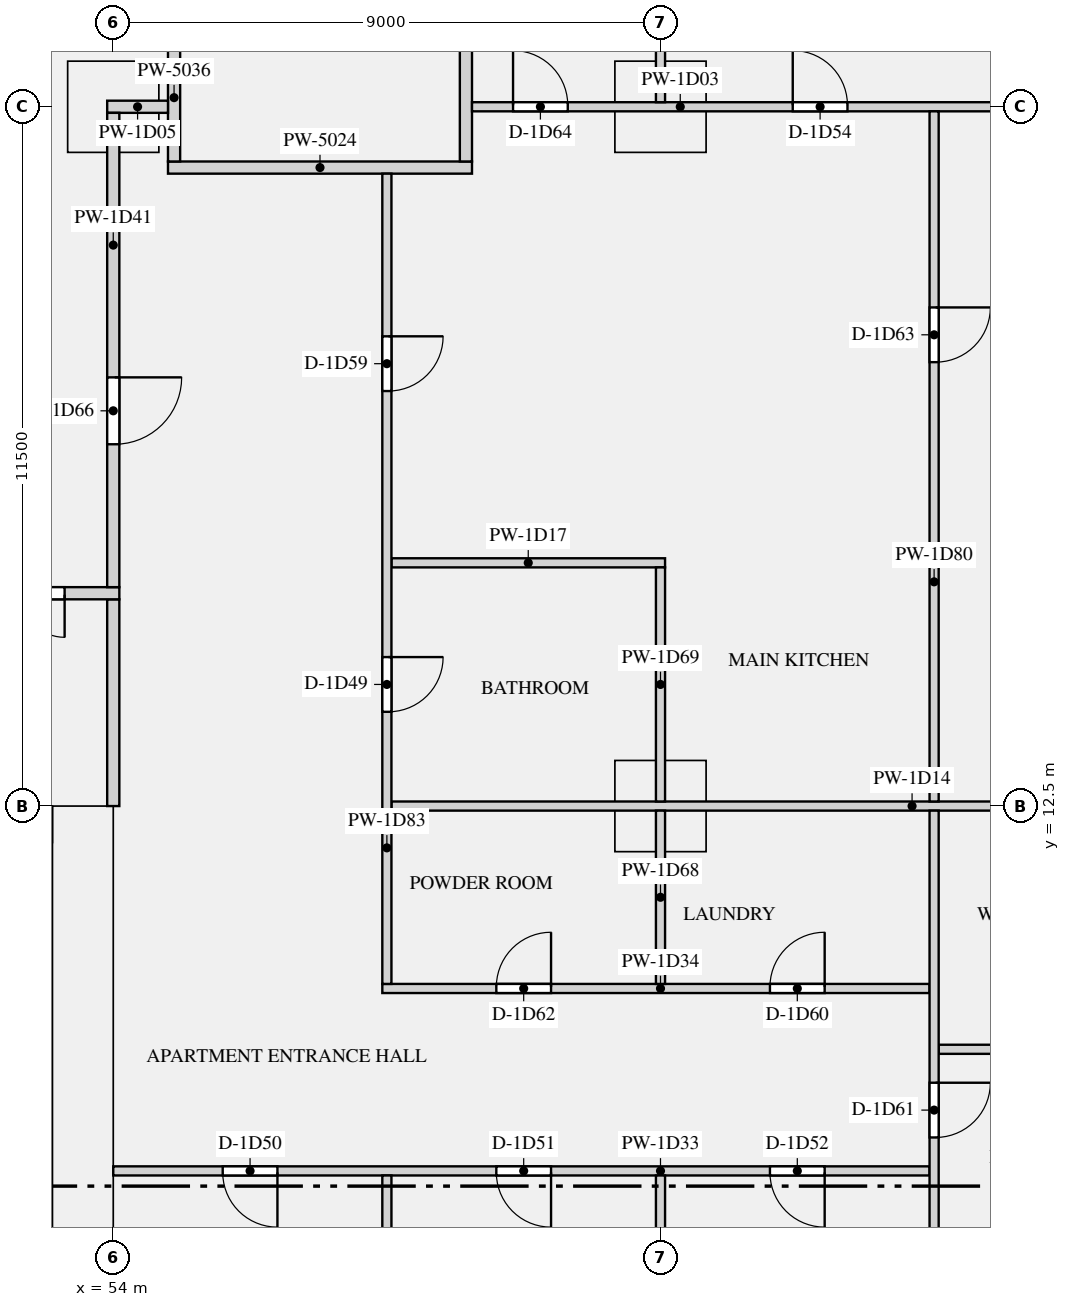
"""IFC4 building model, lengths in metres.
Left out: names, types, materials, properties, quantities, classifications, styles, units other than length and angle.
Written with IfcOpenShell. Run it as: python <this file> out.ifc"""

import sys

from ifc_helpers import new_model, si_unit, direction, frame, frame_2d, origin, origin_2d, place, context, subcontext, project, spatial, rectangle, extrude, element, fill, save


model = new_model("IFC4")
c1 = context("Model", 3, precision=1e-05, world=origin(), true_north=direction((0.0, 1.0)))
c2 = subcontext(c1, "Body", "Model", "MODEL_VIEW")
j1 = project(units=[si_unit("LENGTHUNIT", "METRE"), si_unit("PLANEANGLEUNIT", "RADIAN")], contexts=[c1])
p1 = place(None, origin())
s1 = spatial("IfcSite", under=j1, at=p1, CompositionType="ELEMENT")
p2 = place(p1, origin())
s2 = spatial("IfcBuilding", under=s1, at=p2, CompositionType="ELEMENT")
p3 = place(p2, frame((0.0, 0.0, 47.85)))
s3 = spatial("IfcBuildingStorey", under=s2, at=p3, CompositionType="ELEMENT", Elevation=47.85)
for number, where, z_axis, x_axis in (
    (1, (54.0, 24.0, 0.0), (0.0, 0.0, 1.0), (1.0, 0.0, 0.0)),
    (2, (63.0, 24.0, 0.0), (0.0, 0.0, 1.0), (1.0, 0.0, 0.0)),
    (3, (63.0, 12.5, 0.0), (0.0, 0.0, 1.0), (1.0, 0.0, 0.0)),
):
    element("IfcColumn", number, at=place(p3, frame(where, z_axis=z_axis, x_axis=x_axis)), inside=s3, PredefinedType="COLUMN", context=c2, shape_type="SweptSolid", body=[
        extrude(rectangle(XDim=1.5, YDim=1.5, at=origin_2d()), origin(), (0.0, 0.0, 1.0), 3.15),
    ])
p4 = place(p3, frame((53.5, 0.0, 0.0), z_axis=(0.0, 0.0, 1.0), x_axis=(0.0, 1.0, 0.0)))
e4 = element("IfcWall", 4, at=p4, inside=s3, PredefinedType="SHEAR", context=c2, shape_type="SweptSolid", body=[
    extrude(rectangle(XDim=12.5, YDim=1.0, at=frame_2d((6.25, 0.0))), origin(), (0.0, 0.0, 1.0), 3.15),
])
p5 = place(p3, frame((54.9, 23.0, 0.0), z_axis=(0.0, 0.0, 1.0), x_axis=(1.0, 0.0, 0.0)))
e5 = element("IfcWall", 5, at=p5, inside=s3, PredefinedType="PARTITIONING", context=c2, shape_type="SweptSolid", body=[
    extrude(rectangle(XDim=5.0, YDim=0.2, at=frame_2d((2.5, 0.0))), origin(), (0.0, 0.0, 1.0), 2.83),
])
p6 = place(p3, frame((54.0, 12.5, 0.0), z_axis=(0.0, 0.0, 1.0), x_axis=(0.0, 1.0, 0.0)))
e6 = element("IfcWall", 6, at=p6, inside=s3, PredefinedType="PARTITIONING", context=c2, shape_type="SweptSolid", body=[
    extrude(rectangle(XDim=3.4, YDim=0.2, at=frame_2d((1.7, 0.0))), origin(), (0.0, 0.0, 1.0), 2.83),
])
p7 = place(p3, frame((55.0, 23.1, 0.0), z_axis=(0.0, 0.0, 1.0), x_axis=(0.0, 1.0, 0.0)))
e7 = element("IfcWall", 7, at=p7, inside=s3, PredefinedType="PARTITIONING", context=c2, shape_type="SweptSolid", body=[
    extrude(rectangle(XDim=3.8, YDim=0.2, at=frame_2d((1.9, 0.0))), origin(), (0.0, 0.0, 1.0), 2.83),
])
p8 = place(p7, frame((2.1, 0.0, 0.0)))
e8 = element("IfcOpeningElement", 8, at=p8, cuts=e7, PredefinedType="OPENING", context=c2, shape_type="SweptSolid", body=[
    extrude(rectangle(XDim=1.2, YDim=2.1, at=frame_2d((0.6, 1.05))), frame((0.0, 0.11, 0.0), z_axis=(0.0, -1.0, 0.0), x_axis=(1.0, 0.0, 0.0)), (0.0, 0.0, 1.0), 0.22),
])
p9 = place(p3, frame((59.8, 23.1, 0.0), z_axis=(0.0, 0.0, 1.0), x_axis=(0.0, 1.0, 0.0)))
e9 = element("IfcWall", 9, at=p9, inside=s3, PredefinedType="PARTITIONING", context=c2, shape_type="SweptSolid", body=[
    extrude(rectangle(XDim=3.9, YDim=0.2, at=frame_2d((1.95, 0.0))), origin(), (0.0, 0.0, 1.0), 2.83),
])
p10 = place(p3, frame((59.9, 24.0, 0.0), z_axis=(0.0, 0.0, 1.0), x_axis=(1.0, 0.0, 0.0)))
e10 = element("IfcWall", 10, at=p10, inside=s3, PredefinedType="PARTITIONING", context=c2, shape_type="SweptSolid", body=[
    extrude(rectangle(XDim=13.3, YDim=0.15, at=frame_2d((6.65, 0.0))), origin(), (0.0, 0.0, 1.0), 2.83),
])
p11 = place(p10, frame((5.275, 0.0, 0.0)))
e11 = element("IfcOpeningElement", 11, at=p11, cuts=e10, PredefinedType="OPENING", context=c2, shape_type="SweptSolid", body=[
    extrude(rectangle(XDim=0.9, YDim=2.1, at=frame_2d((0.45, 1.05))), frame((0.0, 0.085, 0.0), z_axis=(0.0, -1.0, 0.0), x_axis=(1.0, 0.0, 0.0)), (0.0, 0.0, 1.0), 0.17),
])
p12 = place(p10, frame((8.725, 0.0, 0.0)))
e12 = element("IfcOpeningElement", 12, at=p12, cuts=e10, PredefinedType="OPENING", context=c2, shape_type="SweptSolid", body=[
    extrude(rectangle(XDim=1.5, YDim=2.1, at=frame_2d((0.75, 1.05))), frame((0.0, 0.085, 0.0), z_axis=(0.0, -1.0, 0.0), x_axis=(1.0, 0.0, 0.0)), (0.0, 0.0, 1.0), 0.17),
])
p13 = place(p10, frame((0.675, 0.0, 0.0)))
e13 = element("IfcOpeningElement", 13, at=p13, cuts=e10, PredefinedType="OPENING", context=c2, shape_type="SweptSolid", body=[
    extrude(rectangle(XDim=0.9, YDim=2.1, at=frame_2d((0.45, 1.05))), frame((0.0, 0.085, 0.0), z_axis=(0.0, -1.0, 0.0), x_axis=(1.0, 0.0, 0.0)), (0.0, 0.0, 1.0), 0.17),
])
p14 = place(p3, frame((53.9, 24.0, 0.0), z_axis=(0.0, 0.0, 1.0), x_axis=(1.0, 0.0, 0.0)))
e14 = element("IfcWall", 14, at=p14, inside=s3, PredefinedType="PARTITIONING", context=c2, shape_type="SweptSolid", body=[
    extrude(rectangle(XDim=1.0, YDim=0.2, at=frame_2d((0.5, 0.0))), origin(), (0.0, 0.0, 1.0), 2.83),
])
p15 = place(p3, frame((67.575, 8.5, 0.0), z_axis=(0.0, 0.0, 1.0), x_axis=(1.0, 0.0, 0.0)))
e15 = element("IfcWall", 15, at=p15, inside=s3, PredefinedType="PARTITIONING", context=c2, shape_type="SweptSolid", body=[
    extrude(rectangle(XDim=8.125, YDim=0.15, at=frame_2d((4.062, 0.0))), origin(), (0.0, 0.0, 1.0), 2.83),
])
p16 = place(p15, frame((5.95, 0.0, 0.0)))
e16 = element("IfcOpeningElement", 16, at=p16, cuts=e15, PredefinedType="OPENING", context=c2, shape_type="SweptSolid", body=[
    extrude(rectangle(XDim=0.8, YDim=2.1, at=frame_2d((0.4, 1.05))), frame((0.0, 0.085, 0.0), z_axis=(0.0, -1.0, 0.0), x_axis=(1.0, 0.0, 0.0)), (0.0, 0.0, 1.0), 0.17),
])
p17 = place(p15, frame((1.775, 0.0, 0.0)))
e17 = element("IfcOpeningElement", 17, at=p17, cuts=e15, PredefinedType="OPENING", context=c2, shape_type="SweptSolid", body=[
    extrude(rectangle(XDim=0.8, YDim=2.1, at=frame_2d((0.4, 1.05))), frame((0.0, 0.085, 0.0), z_axis=(0.0, -1.0, 0.0), x_axis=(1.0, 0.0, 0.0)), (0.0, 0.0, 1.0), 0.17),
])
p18 = place(p3, frame((58.575, 12.5, 0.0), z_axis=(0.0, 0.0, 1.0), x_axis=(1.0, 0.0, 0.0)))
e18 = element("IfcWall", 18, at=p18, inside=s3, PredefinedType="PARTITIONING", context=c2, shape_type="SweptSolid", body=[
    extrude(rectangle(XDim=17.125, YDim=0.15, at=frame_2d((8.562, 0.0))), origin(), (0.0, 0.0, 1.0), 2.83),
])
p19 = place(p3, frame((58.575, 16.5, 0.0), z_axis=(0.0, 0.0, 1.0), x_axis=(1.0, 0.0, 0.0)))
e19 = element("IfcWall", 19, at=p19, inside=s3, PredefinedType="PARTITIONING", context=c2, shape_type="SweptSolid", body=[
    extrude(rectangle(XDim=4.5, YDim=0.15, at=frame_2d((2.25, 0.0))), origin(), (0.0, 0.0, 1.0), 2.83),
])
p20 = place(p3, frame((54.0, 6.5, 0.0), z_axis=(0.0, 0.0, 1.0), x_axis=(1.0, 0.0, 0.0)))
e20 = element("IfcWall", 20, at=p20, inside=s3, PredefinedType="PARTITIONING", context=c2, shape_type="SweptSolid", body=[
    extrude(rectangle(XDim=13.425, YDim=0.15, at=frame_2d((6.712, 0.0))), origin(), (0.0, 0.0, 1.0), 2.83),
])
p21 = place(p20, frame((1.8, 0.0, 0.0)))
e21 = element("IfcOpeningElement", 21, at=p21, cuts=e20, PredefinedType="OPENING", context=c2, shape_type="SweptSolid", body=[
    extrude(rectangle(XDim=0.9, YDim=2.1, at=frame_2d((0.45, 1.05))), frame((0.0, 0.085, 0.0), z_axis=(0.0, -1.0, 0.0), x_axis=(1.0, 0.0, 0.0)), (0.0, 0.0, 1.0), 0.17),
])
p22 = place(p20, frame((6.3, 0.0, 0.0)))
e22 = element("IfcOpeningElement", 22, at=p22, cuts=e20, PredefinedType="OPENING", context=c2, shape_type="SweptSolid", body=[
    extrude(rectangle(XDim=0.9, YDim=2.1, at=frame_2d((0.45, 1.05))), frame((0.0, 0.085, 0.0), z_axis=(0.0, -1.0, 0.0), x_axis=(1.0, 0.0, 0.0)), (0.0, 0.0, 1.0), 0.17),
])
p23 = place(p20, frame((10.8, 0.0, 0.0)))
e23 = element("IfcOpeningElement", 23, at=p23, cuts=e20, PredefinedType="OPENING", context=c2, shape_type="SweptSolid", body=[
    extrude(rectangle(XDim=0.9, YDim=2.1, at=frame_2d((0.45, 1.05))), frame((0.0, 0.085, 0.0), z_axis=(0.0, -1.0, 0.0), x_axis=(1.0, 0.0, 0.0)), (0.0, 0.0, 1.0), 0.17),
])
p24 = place(p3, frame((58.425, 9.5, 0.0), z_axis=(0.0, 0.0, 1.0), x_axis=(1.0, 0.0, 0.0)))
e24 = element("IfcWall", 24, at=p24, inside=s3, PredefinedType="PARTITIONING", context=c2, shape_type="SweptSolid", body=[
    extrude(rectangle(XDim=9.0, YDim=0.15, at=frame_2d((4.5, 0.0))), origin(), (0.0, 0.0, 1.0), 2.83),
])
p25 = place(p24, frame((6.375, 0.0, 0.0)))
e25 = element("IfcOpeningElement", 25, at=p25, cuts=e24, PredefinedType="OPENING", context=c2, shape_type="SweptSolid", body=[
    extrude(rectangle(XDim=0.9, YDim=2.1, at=frame_2d((0.45, 1.05))), frame((0.0, 0.085, 0.0), z_axis=(0.0, -1.0, 0.0), x_axis=(1.0, 0.0, 0.0)), (0.0, 0.0, 1.0), 0.17),
])
p26 = place(p24, frame((1.875, 0.0, 0.0)))
e26 = element("IfcOpeningElement", 26, at=p26, cuts=e24, PredefinedType="OPENING", context=c2, shape_type="SweptSolid", body=[
    extrude(rectangle(XDim=0.9, YDim=2.1, at=frame_2d((0.45, 1.05))), frame((0.0, 0.085, 0.0), z_axis=(0.0, -1.0, 0.0), x_axis=(1.0, 0.0, 0.0)), (0.0, 0.0, 1.0), 0.17),
])
p27 = place(p3, frame((17.9, 16.0, 0.0), z_axis=(0.0, 0.0, 1.0), x_axis=(1.0, 0.0, 0.0)))
e27 = element("IfcWall", 27, at=p27, inside=s3, PredefinedType="PARTITIONING", context=c2, shape_type="SweptSolid", body=[
    extrude(rectangle(XDim=36.2, YDim=0.2, at=frame_2d((18.1, 0.0))), origin(), (0.0, 0.0, 1.0), 2.83),
])
p28 = place(p27, frame((0.9, 0.0, 0.0)))
e28 = element("IfcOpeningElement", 28, at=p28, cuts=e27, PredefinedType="OPENING", context=c2, shape_type="SweptSolid", body=[
    extrude(rectangle(XDim=1.4, YDim=2.1, at=frame_2d((0.7, 1.05))), frame((0.0, 0.11, 0.0), z_axis=(0.0, -1.0, 0.0), x_axis=(1.0, 0.0, 0.0)), (0.0, 0.0, 1.0), 0.22),
])
p29 = place(p27, frame((33.9, 0.0, 0.0)))
e29 = element("IfcOpeningElement", 29, at=p29, cuts=e27, PredefinedType="OPENING", context=c2, shape_type="SweptSolid", body=[
    extrude(rectangle(XDim=1.4, YDim=2.1, at=frame_2d((0.7, 1.05))), frame((0.0, 0.11, 0.0), z_axis=(0.0, -1.0, 0.0), x_axis=(1.0, 0.0, 0.0)), (0.0, 0.0, 1.0), 0.22),
])
p30 = place(p3, frame((54.0, 16.1, 0.0), z_axis=(0.0, 0.0, 1.0), x_axis=(0.0, 1.0, 0.0)))
e30 = element("IfcWall", 30, at=p30, inside=s3, PredefinedType="PARTITIONING", context=c2, shape_type="SweptSolid", body=[
    extrude(rectangle(XDim=7.8, YDim=0.2, at=frame_2d((3.9, 0.0))), origin(), (0.0, 0.0, 1.0), 2.83),
])
p31 = place(p30, frame((2.35, 0.0, 0.0)))
e31 = element("IfcOpeningElement", 31, at=p31, cuts=e30, PredefinedType="OPENING", context=c2, shape_type="SweptSolid", body=[
    extrude(rectangle(XDim=1.1, YDim=2.1, at=frame_2d((0.55, 1.05))), frame((0.0, 0.11, 0.0), z_axis=(0.0, -1.0, 0.0), x_axis=(1.0, 0.0, 0.0)), (0.0, 0.0, 1.0), 0.22),
])
p32 = place(p3, frame((63.0, 0.8, 0.0), z_axis=(0.0, 0.0, 1.0), x_axis=(0.0, 1.0, 0.0)))
e32 = element("IfcWall", 32, at=p32, inside=s3, PredefinedType="PARTITIONING", context=c2, shape_type="SweptSolid", body=[
    extrude(rectangle(XDim=5.625, YDim=0.15, at=frame_2d((2.812, 0.0))), origin(), (0.0, 0.0, 1.0), 2.83),
])
p33 = place(p3, frame((63.0, 9.575, 0.0), z_axis=(0.0, 0.0, 1.0), x_axis=(0.0, 1.0, 0.0)))
e33 = element("IfcWall", 33, at=p33, inside=s3, PredefinedType="PARTITIONING", context=c2, shape_type="SweptSolid", body=[
    extrude(rectangle(XDim=2.85, YDim=0.15, at=frame_2d((1.425, 0.0))), origin(), (0.0, 0.0, 1.0), 2.83),
])
p34 = place(p3, frame((63.0, 12.575, 0.0), z_axis=(0.0, 0.0, 1.0), x_axis=(0.0, 1.0, 0.0)))
e34 = element("IfcWall", 34, at=p34, inside=s3, PredefinedType="PARTITIONING", context=c2, shape_type="SweptSolid", body=[
    extrude(rectangle(XDim=3.85, YDim=0.15, at=frame_2d((1.925, 0.0))), origin(), (0.0, 0.0, 1.0), 2.83),
])
p35 = place(p3, frame((63.0, 24.075, 0.0), z_axis=(0.0, 0.0, 1.0), x_axis=(0.0, 1.0, 0.0)))
e35 = element("IfcWall", 35, at=p35, inside=s3, PredefinedType="PARTITIONING", context=c2, shape_type="SweptSolid", body=[
    extrude(rectangle(XDim=4.35, YDim=0.15, at=frame_2d((2.175, 0.0))), origin(), (0.0, 0.0, 1.0), 2.83),
])
p36 = place(p35, frame((2.1, 0.0, 0.0)))
e36 = element("IfcOpeningElement", 36, at=p36, cuts=e35, PredefinedType="OPENING", context=c2, shape_type="SweptSolid", body=[
    extrude(rectangle(XDim=0.9, YDim=2.1, at=frame_2d((0.45, 1.05))), frame((0.0, 0.085, 0.0), z_axis=(0.0, -1.0, 0.0), x_axis=(1.0, 0.0, 0.0)), (0.0, 0.0, 1.0), 0.17),
])
p37 = place(p3, frame((67.5, 0.8, 0.0), z_axis=(0.0, 0.0, 1.0), x_axis=(0.0, 1.0, 0.0)))
e37 = element("IfcWall", 37, at=p37, inside=s3, PredefinedType="PARTITIONING", context=c2, shape_type="SweptSolid", body=[
    extrude(rectangle(XDim=11.625, YDim=0.15, at=frame_2d((5.812, 0.0))), origin(), (0.0, 0.0, 1.0), 2.83),
])
p38 = place(p37, frame((6.25, 0.0, 0.0)))
e38 = element("IfcOpeningElement", 38, at=p38, cuts=e37, PredefinedType="OPENING", context=c2, shape_type="SweptSolid", body=[
    extrude(rectangle(XDim=0.9, YDim=2.1, at=frame_2d((0.45, 1.05))), frame((0.0, 0.085, 0.0), z_axis=(0.0, -1.0, 0.0), x_axis=(1.0, 0.0, 0.0)), (0.0, 0.0, 1.0), 0.17),
])
p39 = place(p3, frame((67.5, 12.575, 0.0), z_axis=(0.0, 0.0, 1.0), x_axis=(0.0, 1.0, 0.0)))
e39 = element("IfcWall", 39, at=p39, inside=s3, PredefinedType="PARTITIONING", context=c2, shape_type="SweptSolid", body=[
    extrude(rectangle(XDim=11.35, YDim=0.15, at=frame_2d((5.675, 0.0))), origin(), (0.0, 0.0, 1.0), 2.83),
])
p40 = place(p39, frame((7.225, 0.0, 0.0)))
e40 = element("IfcOpeningElement", 40, at=p40, cuts=e39, PredefinedType="OPENING", context=c2, shape_type="SweptSolid", body=[
    extrude(rectangle(XDim=0.9, YDim=2.1, at=frame_2d((0.45, 1.05))), frame((0.0, 0.085, 0.0), z_axis=(0.0, -1.0, 0.0), x_axis=(1.0, 0.0, 0.0)), (0.0, 0.0, 1.0), 0.17),
])
p41 = place(p3, frame((58.5, 0.8, 0.0), z_axis=(0.0, 0.0, 1.0), x_axis=(0.0, 1.0, 0.0)))
e41 = element("IfcWall", 41, at=p41, inside=s3, PredefinedType="PARTITIONING", context=c2, shape_type="SweptSolid", body=[
    extrude(rectangle(XDim=5.625, YDim=0.15, at=frame_2d((2.812, 0.0))), origin(), (0.0, 0.0, 1.0), 2.83),
])
p42 = place(p3, frame((58.5, 9.575, 0.0), z_axis=(0.0, 0.0, 1.0), x_axis=(0.0, 1.0, 0.0)))
e42 = element("IfcWall", 42, at=p42, inside=s3, PredefinedType="PARTITIONING", context=c2, shape_type="SweptSolid", body=[
    extrude(rectangle(XDim=13.325, YDim=0.15, at=frame_2d((6.663, 0.0))), origin(), (0.0, 0.0, 1.0), 2.83),
])
p43 = place(p42, frame((4.475, 0.0, 0.0)))
e43 = element("IfcOpeningElement", 43, at=p43, cuts=e42, PredefinedType="OPENING", context=c2, shape_type="SweptSolid", body=[
    extrude(rectangle(XDim=0.9, YDim=2.1, at=frame_2d((0.45, 1.05))), frame((0.0, 0.085, 0.0), z_axis=(0.0, -1.0, 0.0), x_axis=(1.0, 0.0, 0.0)), (0.0, 0.0, 1.0), 0.17),
])
p44 = place(p42, frame((9.75, 0.0, 0.0)))
e44 = element("IfcOpeningElement", 44, at=p44, cuts=e42, PredefinedType="OPENING", context=c2, shape_type="SweptSolid", body=[
    extrude(rectangle(XDim=0.9, YDim=2.1, at=frame_2d((0.45, 1.05))), frame((0.0, 0.085, 0.0), z_axis=(0.0, -1.0, 0.0), x_axis=(1.0, 0.0, 0.0)), (0.0, 0.0, 1.0), 0.17),
])
p45 = place(p29, frame((1.4, 0.0, 0.0), z_axis=(0.0, 0.0, 1.0), x_axis=(-1.0, 0.0, 0.0)))
e45 = element("IfcDoor", 45, at=p45, inside=s3, OperationType="DOUBLE_DOOR_SINGLE_SWING", PredefinedType="DOOR", context=c2, shape_type="SweptSolid", body=[
    extrude(rectangle(XDim=1.4, YDim=2.1, at=frame_2d((0.7, 1.05))), frame((0.0, 0.025, 0.0), z_axis=(0.0, -1.0, 0.0), x_axis=(1.0, 0.0, 0.0)), (0.0, 0.0, 1.0), 0.05),
])
fill(e29, e45)
p46 = place(p43, frame((0.9, 0.0, 0.0), z_axis=(0.0, 0.0, 1.0), x_axis=(-1.0, 0.0, 0.0)))
e46 = element("IfcDoor", 46, at=p46, inside=s3, OperationType="SINGLE_SWING_LEFT", PredefinedType="DOOR", context=c2, shape_type="SweptSolid", body=[
    extrude(rectangle(XDim=0.9, YDim=2.1, at=frame_2d((0.45, 1.05))), frame((0.0, 0.025, 0.0), z_axis=(0.0, -1.0, 0.0), x_axis=(1.0, 0.0, 0.0)), (0.0, 0.0, 1.0), 0.05),
])
fill(e43, e46)
p47 = place(p21, frame((0.9, 0.0, 0.0), z_axis=(0.0, 0.0, 1.0), x_axis=(-1.0, 0.0, 0.0)))
e47 = element("IfcDoor", 47, at=p47, inside=s3, OperationType="SINGLE_SWING_LEFT", PredefinedType="DOOR", context=c2, shape_type="SweptSolid", body=[
    extrude(rectangle(XDim=0.9, YDim=2.1, at=frame_2d((0.45, 1.05))), frame((0.0, 0.025, 0.0), z_axis=(0.0, -1.0, 0.0), x_axis=(1.0, 0.0, 0.0)), (0.0, 0.0, 1.0), 0.05),
])
fill(e21, e47)
p48 = place(p22, frame((0.9, 0.0, 0.0), z_axis=(0.0, 0.0, 1.0), x_axis=(-1.0, 0.0, 0.0)))
e48 = element("IfcDoor", 48, at=p48, inside=s3, OperationType="SINGLE_SWING_LEFT", PredefinedType="DOOR", context=c2, shape_type="SweptSolid", body=[
    extrude(rectangle(XDim=0.9, YDim=2.1, at=frame_2d((0.45, 1.05))), frame((0.0, 0.025, 0.0), z_axis=(0.0, -1.0, 0.0), x_axis=(1.0, 0.0, 0.0)), (0.0, 0.0, 1.0), 0.05),
])
fill(e22, e48)
p49 = place(p23, frame((0.9, 0.0, 0.0), z_axis=(0.0, 0.0, 1.0), x_axis=(-1.0, 0.0, 0.0)))
e49 = element("IfcDoor", 49, at=p49, inside=s3, OperationType="SINGLE_SWING_LEFT", PredefinedType="DOOR", context=c2, shape_type="SweptSolid", body=[
    extrude(rectangle(XDim=0.9, YDim=2.1, at=frame_2d((0.45, 1.05))), frame((0.0, 0.025, 0.0), z_axis=(0.0, -1.0, 0.0), x_axis=(1.0, 0.0, 0.0)), (0.0, 0.0, 1.0), 0.05),
])
fill(e23, e49)
p50 = place(p11, origin())
e50 = element("IfcDoor", 50, at=p50, inside=s3, OperationType="SINGLE_SWING_LEFT", PredefinedType="DOOR", context=c2, shape_type="SweptSolid", body=[
    extrude(rectangle(XDim=0.9, YDim=2.1, at=frame_2d((0.45, 1.05))), frame((0.0, 0.025, 0.0), z_axis=(0.0, -1.0, 0.0), x_axis=(1.0, 0.0, 0.0)), (0.0, 0.0, 1.0), 0.05),
])
fill(e11, e50)
p51 = place(p44, frame((0.9, 0.0, 0.0), z_axis=(0.0, 0.0, 1.0), x_axis=(-1.0, 0.0, 0.0)))
e51 = element("IfcDoor", 51, at=p51, inside=s3, OperationType="SINGLE_SWING_LEFT", PredefinedType="DOOR", context=c2, shape_type="SweptSolid", body=[
    extrude(rectangle(XDim=0.9, YDim=2.1, at=frame_2d((0.45, 1.05))), frame((0.0, 0.025, 0.0), z_axis=(0.0, -1.0, 0.0), x_axis=(1.0, 0.0, 0.0)), (0.0, 0.0, 1.0), 0.05),
])
fill(e44, e51)
p52 = place(p25, origin())
e52 = element("IfcDoor", 52, at=p52, inside=s3, OperationType="SINGLE_SWING_RIGHT", PredefinedType="DOOR", context=c2, shape_type="SweptSolid", body=[
    extrude(rectangle(XDim=0.9, YDim=2.1, at=frame_2d((0.45, 1.05))), frame((0.0, 0.025, 0.0), z_axis=(0.0, -1.0, 0.0), x_axis=(1.0, 0.0, 0.0)), (0.0, 0.0, 1.0), 0.05),
])
fill(e25, e52)
p53 = place(p38, frame((0.9, 0.0, 0.0), z_axis=(0.0, 0.0, 1.0), x_axis=(-1.0, 0.0, 0.0)))
e53 = element("IfcDoor", 53, at=p53, inside=s3, OperationType="SINGLE_SWING_LEFT", PredefinedType="DOOR", context=c2, shape_type="SweptSolid", body=[
    extrude(rectangle(XDim=0.9, YDim=2.1, at=frame_2d((0.45, 1.05))), frame((0.0, 0.025, 0.0), z_axis=(0.0, -1.0, 0.0), x_axis=(1.0, 0.0, 0.0)), (0.0, 0.0, 1.0), 0.05),
])
fill(e38, e53)
p54 = place(p26, origin())
e54 = element("IfcDoor", 54, at=p54, inside=s3, OperationType="SINGLE_SWING_RIGHT", PredefinedType="DOOR", context=c2, shape_type="SweptSolid", body=[
    extrude(rectangle(XDim=0.9, YDim=2.1, at=frame_2d((0.45, 1.05))), frame((0.0, 0.025, 0.0), z_axis=(0.0, -1.0, 0.0), x_axis=(1.0, 0.0, 0.0)), (0.0, 0.0, 1.0), 0.05),
])
fill(e26, e54)
p55 = place(p40, frame((0.9, 0.0, 0.0), z_axis=(0.0, 0.0, 1.0), x_axis=(-1.0, 0.0, 0.0)))
e55 = element("IfcDoor", 55, at=p55, inside=s3, OperationType="SINGLE_SWING_LEFT", PredefinedType="DOOR", context=c2, shape_type="SweptSolid", body=[
    extrude(rectangle(XDim=0.9, YDim=2.1, at=frame_2d((0.45, 1.05))), frame((0.0, 0.025, 0.0), z_axis=(0.0, -1.0, 0.0), x_axis=(1.0, 0.0, 0.0)), (0.0, 0.0, 1.0), 0.05),
])
fill(e40, e55)
p56 = place(p13, origin())
e56 = element("IfcDoor", 56, at=p56, inside=s3, OperationType="SINGLE_SWING_LEFT", PredefinedType="DOOR", context=c2, shape_type="SweptSolid", body=[
    extrude(rectangle(XDim=0.9, YDim=2.1, at=frame_2d((0.45, 1.05))), frame((0.0, 0.025, 0.0), z_axis=(0.0, -1.0, 0.0), x_axis=(1.0, 0.0, 0.0)), (0.0, 0.0, 1.0), 0.05),
])
fill(e13, e56)
p57 = place(p31, frame((1.1, 0.0, 0.0), z_axis=(0.0, 0.0, 1.0), x_axis=(-1.0, 0.0, 0.0)))
e57 = element("IfcDoor", 57, at=p57, inside=s3, OperationType="SINGLE_SWING_LEFT", PredefinedType="DOOR", context=c2, shape_type="SweptSolid", body=[
    extrude(rectangle(XDim=1.1, YDim=2.1, at=frame_2d((0.55, 1.05))), frame((0.0, 0.025, 0.0), z_axis=(0.0, -1.0, 0.0), x_axis=(1.0, 0.0, 0.0)), (0.0, 0.0, 1.0), 0.05),
])
fill(e31, e57)
save(model, sys.argv[1])
